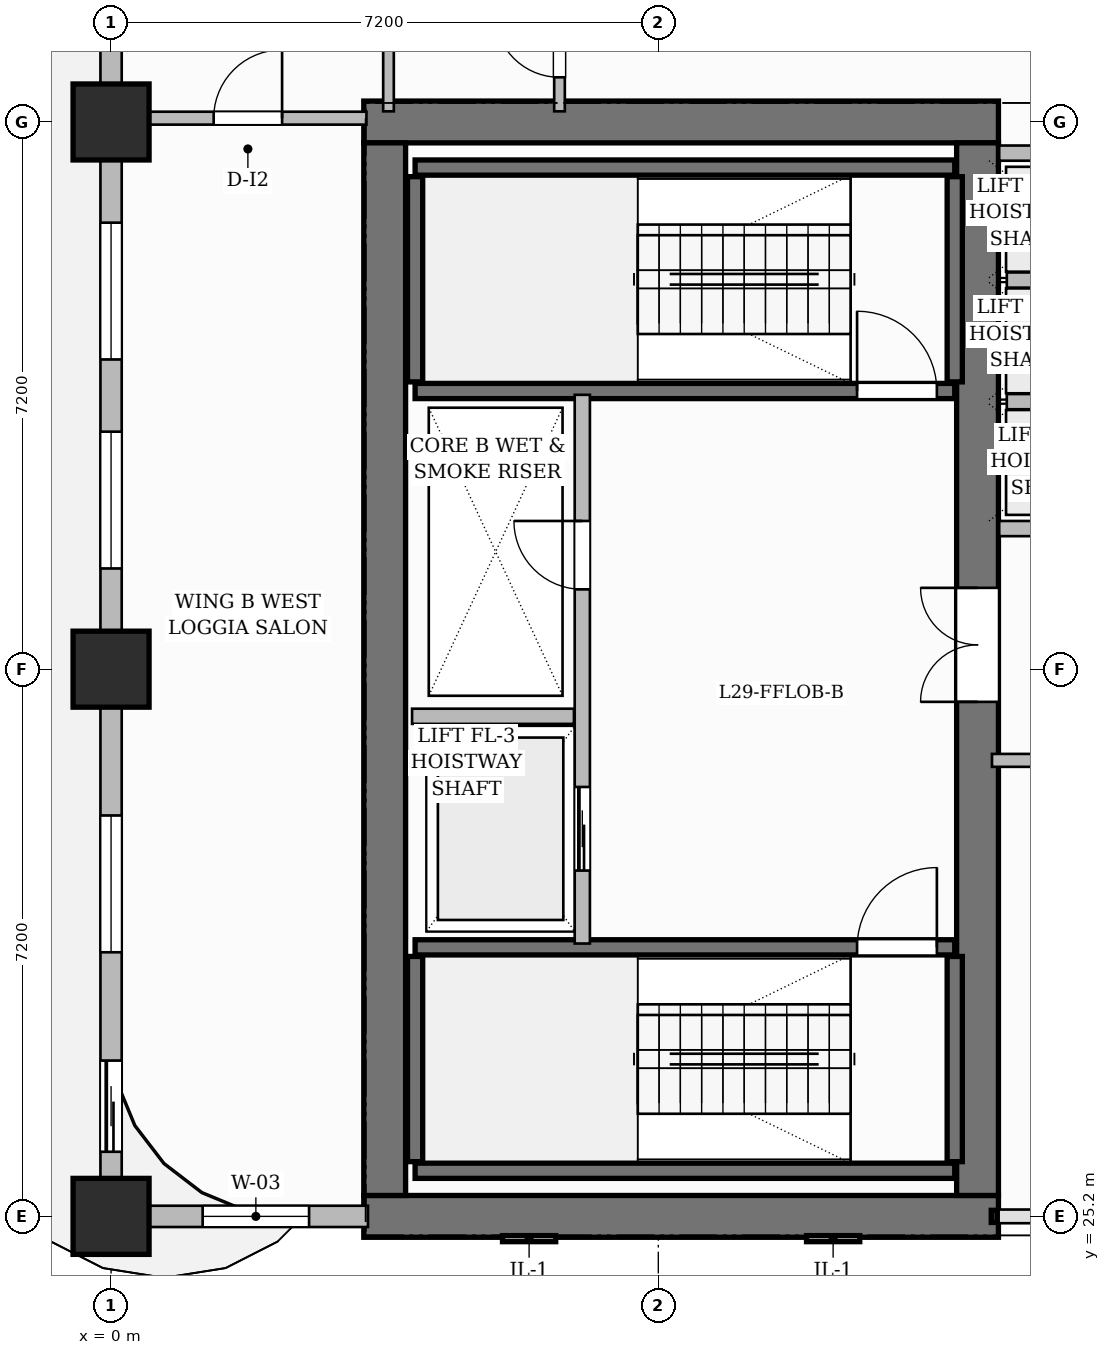
"""IFC4 building model, lengths in metres.
Left out: names, types, materials, properties, quantities, classifications, styles, units other than length and angle.
Written with IfcOpenShell. Run it as: python <this file> out.ifc"""

import sys

from ifc_helpers import new_model, si_unit, direction, frame, frame_2d, origin, origin_2d, place, context, subcontext, project, spatial, rectangle, extrude, source, transform, mapped, element, fill, save


model = new_model("IFC4")
c1 = context("Model", 3, precision=1e-05, world=origin(), true_north=direction((0.0, 1.0)))
c2 = subcontext(c1, "Body", "Model", "MODEL_VIEW")
j1 = project(units=[si_unit("LENGTHUNIT", "METRE"), si_unit("PLANEANGLEUNIT", "RADIAN")], contexts=[c1])
p1 = place(None, origin())
s1 = spatial("IfcSite", under=j1, at=p1, CompositionType="ELEMENT")
p2 = place(p1, origin())
s2 = spatial("IfcBuilding", under=s1, at=p2, CompositionType="ELEMENT")
p3 = place(p2, frame((0.0, 0.0, 119.2)))
s3 = spatial("IfcBuildingStorey", under=s2, at=p3, CompositionType="ELEMENT", Elevation=119.2)
for number, where, z_axis, x_axis in (
    (1, (3.325, 25.2, 0.0), (0.0, 0.0, 1.0), (1.0, 0.0, 0.0)),
    (2, (3.325, 39.6, 0.0), (0.0, 0.0, 1.0), (1.0, 0.0, 0.0)),
):
    element("IfcWall", number, at=place(p3, frame(where, z_axis=z_axis, x_axis=x_axis)), inside=s3, PredefinedType="SHEAR", context=c2, shape_type="SweptSolid", body=[
        extrude(rectangle(XDim=8.35, YDim=0.55, at=frame_2d((4.175, 0.0))), origin(), (0.0, 0.0, 1.0), 3.7),
    ])
p4 = place(p3, frame((3.6, 25.475, 0.0), z_axis=(0.0, 0.0, 1.0), x_axis=(0.0, 1.0, 0.0)))
e3 = element("IfcWall", 3, at=p4, inside=s3, PredefinedType="SHEAR", context=c2, shape_type="SweptSolid", body=[
    extrude(rectangle(XDim=13.85, YDim=0.55, at=frame_2d((6.925, 0.0))), origin(), (0.0, 0.0, 1.0), 3.7),
])
p5 = place(p3, frame((11.4, 25.475, 0.0), z_axis=(0.0, 0.0, 1.0), x_axis=(0.0, 1.0, 0.0)))
e4 = element("IfcWall", 4, at=p5, inside=s3, PredefinedType="SHEAR", context=c2, shape_type="SweptSolid", body=[
    extrude(rectangle(XDim=13.85, YDim=0.55, at=frame_2d((6.925, 0.0))), origin(), (0.0, 0.0, 1.0), 3.7),
])
p6 = place(p5, frame((6.495, 0.0, 0.0)))
e5 = element("IfcOpeningElement", 5, at=p6, cuts=e4, PredefinedType="OPENING", context=c2, shape_type="SweptSolid", body=[
    extrude(rectangle(XDim=1.5, YDim=2.2, at=frame_2d((0.75, 1.1))), frame((0.0, 0.285, 0.0), z_axis=(0.0, -1.0, 0.0), x_axis=(1.0, 0.0, 0.0)), (0.0, 0.0, 1.0), 0.57),
])
m1 = source(origin(), c2, "Body", "SweptSolid", [
    extrude(rectangle(XDim=1.0, YDim=1.0, at=origin_2d()), origin(), (0.0, 0.0, 1.0), 3.7),
])
for number, where, z_axis, x_axis in (
    (6, (0.0, 25.2, 0.0), (0.0, 0.0, 1.0), (1.0, 0.0, 0.0)),
    (7, (0.0, 32.4, 0.0), (0.0, 0.0, 1.0), (1.0, 0.0, 0.0)),
    (8, (0.0, 39.6, 0.0), (0.0, 0.0, 1.0), (1.0, 0.0, 0.0)),
):
    element("IfcColumn", number, at=place(p3, frame(where, z_axis=z_axis, x_axis=x_axis)), inside=s3, PredefinedType="COLUMN", context=c2, shape_type="MappedRepresentation", body=[
        mapped(m1, transform((0.0, 0.0, 0.0), scale=1.0)),
    ])
p7 = place(p3, frame((4.0, 25.8, 0.0), z_axis=(0.0, 0.0, 1.0), x_axis=(1.0, 0.0, 0.0)))
e9 = element("IfcWall", 9, at=p7, inside=s3, PredefinedType="SHEAR", context=c2, shape_type="SweptSolid", body=[
    extrude(rectangle(XDim=7.1, YDim=0.2, at=frame_2d((3.55, 0.0))), origin(), (0.0, 0.0, 1.0), 3.7),
])
for number, where, z_axis, x_axis in (
    (10, (4.0, 25.92, 0.0), (0.0, 0.0, 1.0), (0.0, 1.0, 0.0)),
    (11, (11.1, 25.92, 0.0), (0.0, 0.0, 1.0), (0.0, 1.0, 0.0)),
):
    element("IfcWall", number, at=place(p3, frame(where, z_axis=z_axis, x_axis=x_axis)), inside=s3, PredefinedType="SHEAR", context=c2, shape_type="SweptSolid", body=[
        extrude(rectangle(XDim=2.7, YDim=0.2, at=frame_2d((1.35, 0.0))), origin(), (0.0, 0.0, 1.0), 3.7),
    ])
p8 = place(p3, frame((4.0, 28.74, 0.0), z_axis=(0.0, 0.0, 1.0), x_axis=(1.0, 0.0, 0.0)))
e12 = element("IfcWall", 12, at=p8, inside=s3, PredefinedType="SHEAR", context=c2, shape_type="SweptSolid", body=[
    extrude(rectangle(XDim=7.1, YDim=0.2, at=frame_2d((3.55, 0.0))), origin(), (0.0, 0.0, 1.0), 3.7),
])
p9 = place(p8, frame((5.815, 0.0, 0.0)))
e13 = element("IfcOpeningElement", 13, at=p9, cuts=e12, PredefinedType="OPENING", context=c2, shape_type="SweptSolid", body=[
    extrude(rectangle(XDim=1.05, YDim=2.2, at=frame_2d((0.525, 1.1))), frame((0.0, 0.11, 0.0), z_axis=(0.0, -1.0, 0.0), x_axis=(1.0, 0.0, 0.0)), (0.0, 0.0, 1.0), 0.22),
])
p10 = place(p3, frame((4.0, 39.0, 0.0), z_axis=(0.0, 0.0, 1.0), x_axis=(1.0, 0.0, 0.0)))
e14 = element("IfcWall", 14, at=p10, inside=s3, PredefinedType="SHEAR", context=c2, shape_type="SweptSolid", body=[
    extrude(rectangle(XDim=7.1, YDim=0.2, at=frame_2d((3.55, 0.0))), origin(), (0.0, 0.0, 1.0), 3.7),
])
for number, where, z_axis, x_axis in (
    (15, (4.0, 36.18, 0.0), (0.0, 0.0, 1.0), (0.0, 1.0, 0.0)),
    (16, (11.1, 36.18, 0.0), (0.0, 0.0, 1.0), (0.0, 1.0, 0.0)),
):
    element("IfcWall", number, at=place(p3, frame(where, z_axis=z_axis, x_axis=x_axis)), inside=s3, PredefinedType="SHEAR", context=c2, shape_type="SweptSolid", body=[
        extrude(rectangle(XDim=2.7, YDim=0.2, at=frame_2d((1.35, 0.0))), origin(), (0.0, 0.0, 1.0), 3.7),
    ])
p11 = place(p3, frame((4.0, 36.06, 0.0), z_axis=(0.0, 0.0, 1.0), x_axis=(1.0, 0.0, 0.0)))
e17 = element("IfcWall", 17, at=p11, inside=s3, PredefinedType="SHEAR", context=c2, shape_type="SweptSolid", body=[
    extrude(rectangle(XDim=7.1, YDim=0.2, at=frame_2d((3.55, 0.0))), origin(), (0.0, 0.0, 1.0), 3.7),
])
p12 = place(p11, frame((5.815, 0.0, 0.0)))
e18 = element("IfcOpeningElement", 18, at=p12, cuts=e17, PredefinedType="OPENING", context=c2, shape_type="SweptSolid", body=[
    extrude(rectangle(XDim=1.05, YDim=2.2, at=frame_2d((0.525, 1.1))), frame((0.0, 0.11, 0.0), z_axis=(0.0, -1.0, 0.0), x_axis=(1.0, 0.0, 0.0)), (0.0, 0.0, 1.0), 0.22),
])
p13 = place(p3, frame((6.2, 28.79, 0.0), z_axis=(0.0, 0.0, 1.0), x_axis=(0.0, 1.0, 0.0)))
e19 = element("IfcWall", 19, at=p13, inside=s3, PredefinedType="PARTITIONING", context=c2, shape_type="SweptSolid", body=[
    extrude(rectangle(XDim=7.22, YDim=0.2, at=frame_2d((3.61, 0.0))), origin(), (0.0, 0.0, 1.0), 3.45),
])
p14 = place(p13, frame((4.66, 0.0, 0.0)))
e20 = element("IfcOpeningElement", 20, at=p14, cuts=e19, PredefinedType="OPENING", context=c2, shape_type="SweptSolid", body=[
    extrude(rectangle(XDim=0.9, YDim=2.1, at=frame_2d((0.45, 1.05))), frame((0.0, 0.11, 0.0), z_axis=(0.0, -1.0, 0.0), x_axis=(1.0, 0.0, 0.0)), (0.0, 0.0, 1.0), 0.22),
])
p15 = place(p13, frame((0.96, 0.0, 0.0)))
e21 = element("IfcOpeningElement", 21, at=p15, cuts=e19, PredefinedType="OPENING", context=c2, shape_type="SweptSolid", body=[
    extrude(rectangle(XDim=1.1, YDim=2.2, at=frame_2d((0.55, 1.1))), frame((0.0, 0.11, 0.0), z_axis=(0.0, -1.0, 0.0), x_axis=(1.0, 0.0, 0.0)), (0.0, 0.0, 1.0), 0.22),
])
p16 = place(p3, frame((3.96, 31.78, 0.0), z_axis=(0.0, 0.0, 1.0), x_axis=(1.0, 0.0, 0.0)))
e22 = element("IfcWall", 22, at=p16, inside=s3, PredefinedType="PARTITIONING", context=c2, shape_type="SweptSolid", body=[
    extrude(rectangle(XDim=2.13, YDim=0.2, at=frame_2d((1.065, 0.0))), origin(), (0.0, 0.0, 1.0), 3.45),
])
for number, where, z_axis, x_axis in (
    (23, (11.685, 34.25, 0.0), (0.0, 0.0, 1.0), (1.0, 0.0, 0.0)),
    (24, (11.685, 39.19, 0.0), (0.0, 0.0, 1.0), (1.0, 0.0, 0.0)),
):
    element("IfcWall", number, at=place(p3, frame(where, z_axis=z_axis, x_axis=x_axis)), inside=s3, PredefinedType="PARTITIONING", context=c2, shape_type="SweptSolid", body=[
        extrude(rectangle(XDim=1.985, YDim=0.2, at=frame_2d((0.992, 0.0))), origin(), (0.0, 0.0, 1.0), 3.45),
    ])
for number, where, z_axis, x_axis in (
    (25, (11.785, 35.92, 0.0), (0.0, 0.0, 1.0), (1.0, 0.0, 0.0)),
    (26, (11.785, 37.52, 0.0), (0.0, 0.0, 1.0), (1.0, 0.0, 0.0)),
):
    element("IfcWall", number, at=place(p3, frame(where, z_axis=z_axis, x_axis=x_axis)), inside=s3, PredefinedType="PARTITIONING", context=c2, shape_type="SweptSolid", body=[
        extrude(rectangle(XDim=1.785, YDim=0.2, at=frame_2d((0.893, 0.0))), origin(), (0.0, 0.0, 1.0), 3.45),
    ])
p17 = place(p3, frame((0.24, 39.65, 0.0), z_axis=(0.0, 0.0, 1.0), x_axis=(1.0, 0.0, 0.0)))
e27 = element("IfcWall", 27, at=p17, inside=s3, PredefinedType="PARTITIONING", context=c2, shape_type="SweptSolid", body=[
    extrude(rectangle(XDim=3.12, YDim=0.17, at=frame_2d((1.56, 0.0))), origin(), (0.0, 0.0, 1.0), 3.45),
])
p18 = place(p17, frame((1.11, 0.0, 0.0)))
e28 = element("IfcOpeningElement", 28, at=p18, cuts=e27, PredefinedType="OPENING", context=c2, shape_type="SweptSolid", body=[
    extrude(rectangle(XDim=0.9, YDim=2.15, at=frame_2d((0.45, 1.075))), frame((0.0, 0.095, 0.0), z_axis=(0.0, -1.0, 0.0), x_axis=(1.0, 0.0, 0.0)), (0.0, 0.0, 1.0), 0.19),
])
p19 = place(p3, frame((3.65, 39.74, 0.0), z_axis=(0.0, 0.0, 1.0), x_axis=(0.0, 1.0, 0.0)))
e29 = element("IfcWall", 29, at=p19, inside=s3, PredefinedType="PARTITIONING", context=c2, shape_type="SweptSolid", body=[
    extrude(rectangle(XDim=1.745, YDim=0.14, at=frame_2d((0.873, 0.0))), origin(), (0.0, 0.0, 1.0), 3.45),
])
p20 = place(p3, frame((5.9, 39.74, 0.0), z_axis=(0.0, 0.0, 1.0), x_axis=(0.0, 1.0, 0.0)))
e30 = element("IfcWall", 30, at=p20, inside=s3, PredefinedType="PARTITIONING", context=c2, shape_type="SweptSolid", body=[
    extrude(rectangle(XDim=1.745, YDim=0.14, at=frame_2d((0.873, 0.0))), origin(), (0.0, 0.0, 1.0), 3.45),
])
p21 = place(p20, frame((0.448, 0.0, 0.0)))
e31 = element("IfcOpeningElement", 31, at=p21, cuts=e30, PredefinedType="OPENING", context=c2, shape_type="SweptSolid", body=[
    extrude(rectangle(XDim=0.85, YDim=2.1, at=frame_2d((0.425, 1.05))), frame((0.0, 0.08, 0.0), z_axis=(0.0, -1.0, 0.0), x_axis=(1.0, 0.0, 0.0)), (0.0, 0.0, 1.0), 0.16),
])
p22 = place(p3, frame((11.59, 31.2, 0.0), z_axis=(0.0, 0.0, 1.0), x_axis=(1.0, 0.0, 0.0)))
e32 = element("IfcWall", 32, at=p22, inside=s3, PredefinedType="PARTITIONING", context=c2, shape_type="SweptSolid", body=[
    extrude(rectangle(XDim=3.37, YDim=0.17, at=frame_2d((1.685, 0.0))), origin(), (0.0, 0.0, 1.0), 3.45),
])
p23 = place(p22, frame((1.185, 0.0, 0.0)))
e33 = element("IfcOpeningElement", 33, at=p23, cuts=e32, PredefinedType="OPENING", context=c2, shape_type="SweptSolid", body=[
    extrude(rectangle(XDim=0.95, YDim=2.15, at=frame_2d((0.475, 1.075))), frame((0.0, 0.095, 0.0), z_axis=(0.0, -1.0, 0.0), x_axis=(1.0, 0.0, 0.0)), (0.0, 0.0, 1.0), 0.19),
])
p24 = place(p3, frame((0.0, 25.2, 0.0), z_axis=(0.0, 0.0, 1.0), x_axis=(1.0, 0.0, 0.0)))
e34 = element("IfcWall", 34, at=p24, inside=s3, PredefinedType="SOLIDWALL", context=c2, shape_type="SweptSolid", body=[
    extrude(rectangle(XDim=3.38, YDim=0.28, at=frame_2d((1.69, 0.0))), origin(), (0.0, 0.0, 1.0), 3.45),
])
p25 = place(p24, frame((1.205, 0.0, 0.8)))
e35 = element("IfcOpeningElement", 35, at=p25, cuts=e34, PredefinedType="OPENING", context=c2, shape_type="SweptSolid", body=[
    extrude(rectangle(XDim=1.4, YDim=1.85, at=frame_2d((0.7, 0.925))), frame((0.0, 0.15, 0.0), z_axis=(0.0, -1.0, 0.0), x_axis=(1.0, 0.0, 0.0)), (0.0, 0.0, 1.0), 0.3),
])
p26 = place(p3, frame((0.0, 25.25, 0.0), z_axis=(0.0, 0.0, 1.0), x_axis=(0.0, 1.0, 0.0)))
e36 = element("IfcWall", 36, at=p26, inside=s3, PredefinedType="SOLIDWALL", context=c2, shape_type="SweptSolid", body=[
    extrude(rectangle(XDim=21.5, YDim=0.28, at=frame_2d((10.75, 0.0))), origin(), (0.0, 0.0, 1.0), 2.935),
])
p27 = place(p26, frame((18.607, 0.0, 0.0)))
e37 = element("IfcOpeningElement", 37, at=p27, cuts=e36, PredefinedType="OPENING", context=c2, shape_type="SweptSolid", body=[
    extrude(rectangle(XDim=1.2, YDim=2.2, at=frame_2d((0.6, 1.1))), frame((0.0, 0.15, 0.0), z_axis=(0.0, -1.0, 0.0), x_axis=(1.0, 0.0, 0.0)), (0.0, 0.0, 1.0), 0.3),
])
p28 = place(p26, frame((0.8, 0.0, 0.0)))
e38 = element("IfcOpeningElement", 38, at=p28, cuts=e36, PredefinedType="OPENING", context=c2, shape_type="SweptSolid", body=[
    extrude(rectangle(XDim=1.2, YDim=2.2, at=frame_2d((0.6, 1.1))), frame((0.0, 0.15, 0.0), z_axis=(0.0, -1.0, 0.0), x_axis=(1.0, 0.0, 0.0)), (0.0, 0.0, 1.0), 0.3),
])
p29 = place(p26, frame((3.425, 0.0, 0.8)))
e39 = element("IfcOpeningElement", 39, at=p29, cuts=e36, PredefinedType="OPENING", context=c2, shape_type="SweptSolid", body=[
    extrude(rectangle(XDim=1.8, YDim=1.85, at=frame_2d((0.9, 0.925))), frame((0.0, 0.15, 0.0), z_axis=(0.0, -1.0, 0.0), x_axis=(1.0, 0.0, 0.0)), (0.0, 0.0, 1.0), 0.3),
])
p30 = place(p26, frame((8.475, 0.0, 0.8)))
e40 = element("IfcOpeningElement", 40, at=p30, cuts=e36, PredefinedType="OPENING", context=c2, shape_type="SweptSolid", body=[
    extrude(rectangle(XDim=1.8, YDim=1.85, at=frame_2d((0.9, 0.925))), frame((0.0, 0.15, 0.0), z_axis=(0.0, -1.0, 0.0), x_axis=(1.0, 0.0, 0.0)), (0.0, 0.0, 1.0), 0.3),
])
p31 = place(p26, frame((11.225, 0.0, 0.8)))
e41 = element("IfcOpeningElement", 41, at=p31, cuts=e36, PredefinedType="OPENING", context=c2, shape_type="SweptSolid", body=[
    extrude(rectangle(XDim=1.8, YDim=1.85, at=frame_2d((0.9, 0.925))), frame((0.0, 0.15, 0.0), z_axis=(0.0, -1.0, 0.0), x_axis=(1.0, 0.0, 0.0)), (0.0, 0.0, 1.0), 0.3),
])
p32 = place(p26, frame((15.621, 0.0, 0.8)))
e42 = element("IfcOpeningElement", 42, at=p32, cuts=e36, PredefinedType="OPENING", context=c2, shape_type="SweptSolid", body=[
    extrude(rectangle(XDim=1.8, YDim=1.85, at=frame_2d((0.9, 0.925))), frame((0.0, 0.15, 0.0), z_axis=(0.0, -1.0, 0.0), x_axis=(1.0, 0.0, 0.0)), (0.0, 0.0, 1.0), 0.3),
])
m2 = source(origin(), c2, "Body", "SweptSolid", [
    extrude(rectangle(XDim=1.05, YDim=2.2, at=frame_2d((0.525, 1.1))), frame((0.0, 0.025, 0.0), z_axis=(0.0, -1.0, 0.0), x_axis=(1.0, 0.0, 0.0)), (0.0, 0.0, 1.0), 0.05),
])
p33 = place(p9, origin())
e43 = element("IfcDoor", 43, at=p33, inside=s3, OperationType="SINGLE_SWING_RIGHT", PredefinedType="DOOR", context=c2, shape_type="MappedRepresentation", body=[
    mapped(m2, transform((0.0, 0.0, 0.0), scale=1.0)),
])
fill(e13, e43)
p34 = place(p12, origin())
e44 = element("IfcDoor", 44, at=p34, inside=s3, OperationType="SINGLE_SWING_LEFT", PredefinedType="DOOR", context=c2, shape_type="MappedRepresentation", body=[
    mapped(m2, transform((0.0, 0.0, 0.0), scale=1.0)),
])
fill(e18, e44)
m3 = source(origin(), c2, "Body", "SweptSolid", [
    extrude(rectangle(XDim=0.9, YDim=2.1, at=frame_2d((0.45, 1.05))), frame((0.0, 0.025, 0.0), z_axis=(0.0, -1.0, 0.0), x_axis=(1.0, 0.0, 0.0)), (0.0, 0.0, 1.0), 0.05),
])
p35 = place(p14, origin())
e45 = element("IfcDoor", 45, at=p35, inside=s3, OperationType="SINGLE_SWING_RIGHT", PredefinedType="DOOR", context=c2, shape_type="MappedRepresentation", body=[
    mapped(m3, transform((0.0, 0.0, 0.0), scale=1.0)),
])
fill(e20, e45)
m4 = source(origin(), c2, "Body", "SweptSolid", [
    extrude(rectangle(XDim=1.5, YDim=2.2, at=frame_2d((0.75, 1.1))), frame((0.0, 0.025, 0.0), z_axis=(0.0, -1.0, 0.0), x_axis=(1.0, 0.0, 0.0)), (0.0, 0.0, 1.0), 0.05),
])
p36 = place(p6, origin())
e46 = element("IfcDoor", 46, at=p36, inside=s3, OperationType="DOUBLE_DOOR_SINGLE_SWING", PredefinedType="DOOR", context=c2, shape_type="MappedRepresentation", body=[
    mapped(m4, transform((0.0, 0.0, 0.0), scale=1.0)),
])
fill(e5, e46)
m5 = source(origin(), c2, "Body", "SweptSolid", [
    extrude(rectangle(XDim=0.9, YDim=2.15, at=frame_2d((0.45, 1.075))), frame((0.0, 0.025, 0.0), z_axis=(0.0, -1.0, 0.0), x_axis=(1.0, 0.0, 0.0)), (0.0, 0.0, 1.0), 0.05),
])
p37 = place(p18, origin())
e47 = element("IfcDoor", 47, at=p37, inside=s3, OperationType="SINGLE_SWING_RIGHT", PredefinedType="DOOR", context=c2, shape_type="MappedRepresentation", body=[
    mapped(m5, transform((0.0, 0.0, 0.0), scale=1.0)),
])
fill(e28, e47)
m6 = source(origin(), c2, "Body", "SweptSolid", [
    extrude(rectangle(XDim=0.85, YDim=2.1, at=frame_2d((0.425, 1.05))), frame((0.0, 0.025, 0.0), z_axis=(0.0, -1.0, 0.0), x_axis=(1.0, 0.0, 0.0)), (0.0, 0.0, 1.0), 0.05),
])
p38 = place(p21, origin())
e48 = element("IfcDoor", 48, at=p38, inside=s3, OperationType="SINGLE_SWING_RIGHT", PredefinedType="DOOR", context=c2, shape_type="MappedRepresentation", body=[
    mapped(m6, transform((0.0, 0.0, 0.0), scale=1.0)),
])
fill(e31, e48)
m7 = source(origin(), c2, "Body", "SweptSolid", [
    extrude(rectangle(XDim=1.1, YDim=2.2, at=frame_2d((0.55, 1.1))), frame((0.0, 0.025, 0.0), z_axis=(0.0, -1.0, 0.0), x_axis=(1.0, 0.0, 0.0)), (0.0, 0.0, 1.0), 0.05),
])
p39 = place(p15, origin())
e49 = element("IfcDoor", 49, at=p39, inside=s3, OperationType="SLIDING_TO_LEFT", PredefinedType="DOOR", context=c2, shape_type="MappedRepresentation", body=[
    mapped(m7, transform((0.0, 0.0, 0.0), scale=1.0)),
])
fill(e21, e49)
m8 = source(origin(), c2, "Body", "SweptSolid", [
    extrude(rectangle(XDim=1.2, YDim=2.2, at=frame_2d((0.6, 1.1))), frame((0.0, 0.025, 0.0), z_axis=(0.0, -1.0, 0.0), x_axis=(1.0, 0.0, 0.0)), (0.0, 0.0, 1.0), 0.05),
])
p40 = place(p28, origin())
e50 = element("IfcDoor", 50, at=p40, inside=s3, OperationType="SLIDING_TO_LEFT", PredefinedType="DOOR", context=c2, shape_type="MappedRepresentation", body=[
    mapped(m8, transform((0.0, 0.0, 0.0), scale=1.0)),
])
fill(e38, e50)
m9 = source(origin(), c2, "Body", "SweptSolid", [
    extrude(rectangle(XDim=1.4, YDim=1.85, at=frame_2d((0.7, 0.925))), frame((0.0, 0.03, 0.0), z_axis=(0.0, -1.0, 0.0), x_axis=(1.0, 0.0, 0.0)), (0.0, 0.0, 1.0), 0.06),
])
p41 = place(p25, origin())
e51 = element("IfcWindow", 51, at=p41, inside=s3, PartitioningType="SINGLE_PANEL", PredefinedType="WINDOW", context=c2, shape_type="MappedRepresentation", body=[
    mapped(m9, transform((0.0, 0.0, 0.0), scale=1.0)),
])
fill(e35, e51)
m10 = source(origin(), c2, "Body", "SweptSolid", [
    extrude(rectangle(XDim=1.8, YDim=1.85, at=frame_2d((0.9, 0.925))), frame((0.0, 0.03, 0.0), z_axis=(0.0, -1.0, 0.0), x_axis=(1.0, 0.0, 0.0)), (0.0, 0.0, 1.0), 0.06),
])
p42 = place(p29, origin())
e52 = element("IfcWindow", 52, at=p42, inside=s3, PartitioningType="DOUBLE_PANEL_VERTICAL", PredefinedType="WINDOW", context=c2, shape_type="MappedRepresentation", body=[
    mapped(m10, transform((0.0, 0.0, 0.0), scale=1.0)),
])
fill(e39, e52)
p43 = place(p30, origin())
e53 = element("IfcWindow", 53, at=p43, inside=s3, PartitioningType="DOUBLE_PANEL_VERTICAL", PredefinedType="WINDOW", context=c2, shape_type="MappedRepresentation", body=[
    mapped(m10, transform((0.0, 0.0, 0.0), scale=1.0)),
])
fill(e40, e53)
p44 = place(p31, origin())
e54 = element("IfcWindow", 54, at=p44, inside=s3, PartitioningType="DOUBLE_PANEL_VERTICAL", PredefinedType="WINDOW", context=c2, shape_type="MappedRepresentation", body=[
    mapped(m10, transform((0.0, 0.0, 0.0), scale=1.0)),
])
fill(e41, e54)
save(model, sys.argv[1])
